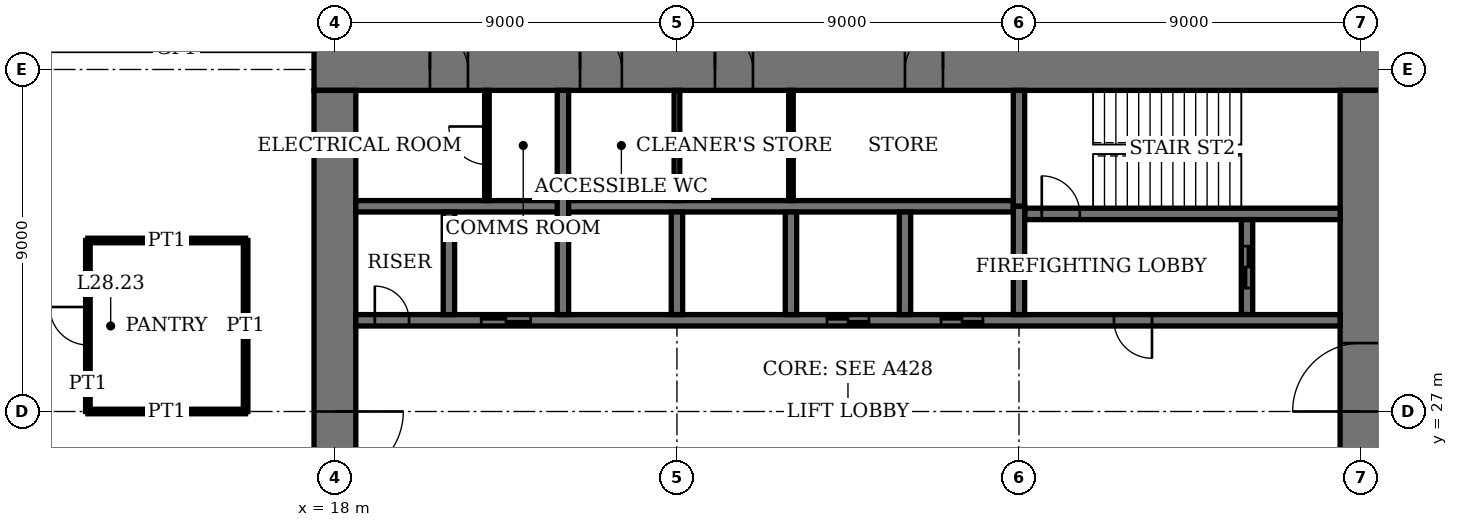
"""IFC4 building model, lengths in metres.
Left out: names, types, materials, properties, quantities, classifications, styles, units other than length and angle.
Written with IfcOpenShell. Run it as: python <this file> out.ifc"""

import sys

from ifc_helpers import new_model, si_unit, direction, frame, frame_2d, origin, place, context, subcontext, project, spatial, rectangle, extrude, element, fill, save


model = new_model("IFC4")
c1 = context("Model", 3, precision=1e-05, world=origin(), true_north=direction((0.0, 1.0)))
c2 = subcontext(c1, "Body", "Model", "MODEL_VIEW")
j1 = project(units=[si_unit("LENGTHUNIT", "METRE"), si_unit("PLANEANGLEUNIT", "RADIAN")], contexts=[c1])
p1 = place(None, origin())
s1 = spatial("IfcSite", under=j1, at=p1, CompositionType="ELEMENT")
p2 = place(p1, origin())
s2 = spatial("IfcBuilding", under=s1, at=p2, CompositionType="ELEMENT")
p3 = place(p2, frame((0.0, 0.0, 117.0)))
s3 = spatial("IfcBuildingStorey", under=s2, at=p3, CompositionType="ELEMENT", Elevation=117.0)
p4 = place(p3, frame((45.55, 36.0, 0.0), z_axis=(0.0, 0.0, 1.0), x_axis=(-1.0, 0.0, 0.0)))
e1 = element("IfcWall", 1, at=p4, inside=s3, PredefinedType="SHEAR", context=c2, shape_type="SweptSolid", body=[
    extrude(rectangle(XDim=28.1, YDim=1.1, at=frame_2d((14.05, 0.0))), origin(), (0.0, 0.0, 1.0), 4.0),
])
p5 = place(p4, frame((11.55, 0.0, 0.0)))
e2 = element("IfcOpeningElement", 2, at=p5, cuts=e1, PredefinedType="OPENING", context=c2, shape_type="SweptSolid", body=[
    extrude(rectangle(XDim=1.0, YDim=2.4, at=frame_2d((0.5, 1.2))), frame((0.0, 0.56, 0.0), z_axis=(0.0, -1.0, 0.0), x_axis=(1.0, 0.0, 0.0)), (0.0, 0.0, 1.0), 1.12),
])
p6 = place(p4, frame((16.55, 0.0, 0.0)))
e3 = element("IfcOpeningElement", 3, at=p6, cuts=e1, PredefinedType="OPENING", context=c2, shape_type="SweptSolid", body=[
    extrude(rectangle(XDim=1.0, YDim=2.4, at=frame_2d((0.5, 1.2))), frame((0.0, 0.56, 0.0), z_axis=(0.0, -1.0, 0.0), x_axis=(1.0, 0.0, 0.0)), (0.0, 0.0, 1.0), 1.12),
])
p7 = place(p4, frame((20.0, 0.0, 0.0)))
e4 = element("IfcOpeningElement", 4, at=p7, cuts=e1, PredefinedType="OPENING", context=c2, shape_type="SweptSolid", body=[
    extrude(rectangle(XDim=1.1, YDim=2.4, at=frame_2d((0.55, 1.2))), frame((0.0, 0.56, 0.0), z_axis=(0.0, -1.0, 0.0), x_axis=(1.0, 0.0, 0.0)), (0.0, 0.0, 1.0), 1.12),
])
p8 = place(p4, frame((24.05, 0.0, 0.0)))
e5 = element("IfcOpeningElement", 5, at=p8, cuts=e1, PredefinedType="OPENING", context=c2, shape_type="SweptSolid", body=[
    extrude(rectangle(XDim=1.0, YDim=2.4, at=frame_2d((0.5, 1.2))), frame((0.0, 0.56, 0.0), z_axis=(0.0, -1.0, 0.0), x_axis=(1.0, 0.0, 0.0)), (0.0, 0.0, 1.0), 1.12),
])
p9 = place(p3, frame((18.0, 35.45, 0.0), z_axis=(0.0, 0.0, 1.0), x_axis=(0.0, -1.0, 0.0)))
e6 = element("IfcWall", 6, at=p9, inside=s3, PredefinedType="SHEAR", context=c2, shape_type="SweptSolid", body=[
    extrude(rectangle(XDim=16.9, YDim=1.1, at=frame_2d((8.45, 0.0))), origin(), (0.0, 0.0, 1.0), 4.0),
])
p10 = place(p9, frame((8.45, 0.0, 0.0)))
e7 = element("IfcOpeningElement", 7, at=p10, cuts=e6, PredefinedType="OPENING", context=c2, shape_type="SweptSolid", body=[
    extrude(rectangle(XDim=1.8, YDim=2.4, at=frame_2d((0.9, 1.2))), frame((0.0, 0.56, 0.0), z_axis=(0.0, -1.0, 0.0), x_axis=(1.0, 0.0, 0.0)), (0.0, 0.0, 1.0), 1.12),
])
p11 = place(p3, frame((45.0, 18.55, 0.0), z_axis=(0.0, 0.0, 1.0), x_axis=(0.0, 1.0, 0.0)))
e8 = element("IfcWall", 8, at=p11, inside=s3, PredefinedType="SHEAR", context=c2, shape_type="SweptSolid", body=[
    extrude(rectangle(XDim=16.9, YDim=1.1, at=frame_2d((8.45, 0.0))), origin(), (0.0, 0.0, 1.0), 4.0),
])
p12 = place(p11, frame((8.45, 0.0, 0.0)))
e9 = element("IfcOpeningElement", 9, at=p12, cuts=e8, PredefinedType="OPENING", context=c2, shape_type="SweptSolid", body=[
    extrude(rectangle(XDim=1.8, YDim=2.4, at=frame_2d((0.9, 1.2))), frame((0.0, 0.56, 0.0), z_axis=(0.0, -1.0, 0.0), x_axis=(1.0, 0.0, 0.0)), (0.0, 0.0, 1.0), 1.12),
])
p13 = place(p3, frame((36.15, 32.2, 0.0), z_axis=(0.0, 0.0, 1.0), x_axis=(1.0, 0.0, 0.0)))
e10 = element("IfcWall", 10, at=p13, inside=s3, PredefinedType="SHEAR", context=c2, shape_type="SweptSolid", body=[
    extrude(rectangle(XDim=8.3, YDim=0.3, at=frame_2d((4.15, 0.0))), origin(), (0.0, 0.0, 1.0), 4.0),
])
p14 = place(p13, frame((0.45, 0.0, 0.0)))
e11 = element("IfcOpeningElement", 11, at=p14, cuts=e10, PredefinedType="OPENING", context=c2, shape_type="SweptSolid", body=[
    extrude(rectangle(XDim=1.0, YDim=2.4, at=frame_2d((0.5, 1.2))), frame((0.0, 0.16, 0.0), z_axis=(0.0, -1.0, 0.0), x_axis=(1.0, 0.0, 0.0)), (0.0, 0.0, 1.0), 0.32),
])
p15 = place(p3, frame((36.0, 32.4, 0.0), z_axis=(0.0, 0.0, 1.0), x_axis=(0.0, 1.0, 0.0)))
e12 = element("IfcWall", 12, at=p15, inside=s3, PredefinedType="SHEAR", context=c2, shape_type="SweptSolid", body=[
    extrude(rectangle(XDim=3.05, YDim=0.3, at=frame_2d((1.525, 0.0))), origin(), (0.0, 0.0, 1.0), 4.0),
])
p16 = place(p3, frame((42.0, 29.55, 0.0), z_axis=(0.0, 0.0, 1.0), x_axis=(0.0, 1.0, 0.0)))
e13 = element("IfcWall", 13, at=p16, inside=s3, PredefinedType="SHEAR", context=c2, shape_type="SweptSolid", body=[
    extrude(rectangle(XDim=2.5, YDim=0.3, at=frame_2d((1.25, 0.0))), origin(), (0.0, 0.0, 1.0), 4.0),
])
p17 = place(p16, frame((0.7, 0.0, 0.0)))
e14 = element("IfcOpeningElement", 14, at=p17, cuts=e13, PredefinedType="OPENING", context=c2, shape_type="SweptSolid", body=[
    extrude(rectangle(XDim=1.1, YDim=2.4, at=frame_2d((0.55, 1.2))), frame((0.0, 0.16, 0.0), z_axis=(0.0, -1.0, 0.0), x_axis=(1.0, 0.0, 0.0)), (0.0, 0.0, 1.0), 0.32),
])
p18 = place(p3, frame((18.55, 29.4, 0.0), z_axis=(0.0, 0.0, 1.0), x_axis=(1.0, 0.0, 0.0)))
e15 = element("IfcWall", 15, at=p18, inside=s3, PredefinedType="SHEAR", context=c2, shape_type="SweptSolid", body=[
    extrude(rectangle(XDim=25.9, YDim=0.3, at=frame_2d((12.95, 0.0))), origin(), (0.0, 0.0, 1.0), 4.0),
])
p19 = place(p18, frame((19.95, 0.0, 0.0)))
e16 = element("IfcOpeningElement", 16, at=p19, cuts=e15, PredefinedType="OPENING", context=c2, shape_type="SweptSolid", body=[
    extrude(rectangle(XDim=1.0, YDim=2.4, at=frame_2d((0.5, 1.2))), frame((0.0, 0.16, 0.0), z_axis=(0.0, -1.0, 0.0), x_axis=(1.0, 0.0, 0.0)), (0.0, 0.0, 1.0), 0.32),
])
p20 = place(p18, frame((0.5, 0.0, 0.0)))
e17 = element("IfcOpeningElement", 17, at=p20, cuts=e15, PredefinedType="OPENING", context=c2, shape_type="SweptSolid", body=[
    extrude(rectangle(XDim=0.9, YDim=2.1, at=frame_2d((0.45, 1.05))), frame((0.0, 0.16, 0.0), z_axis=(0.0, -1.0, 0.0), x_axis=(1.0, 0.0, 0.0)), (0.0, 0.0, 1.0), 0.32),
])
p21 = place(p18, frame((15.4, 0.0, 0.0)))
e18 = element("IfcOpeningElement", 18, at=p21, cuts=e15, PredefinedType="OPENING", context=c2, shape_type="SweptSolid", body=[
    extrude(rectangle(XDim=1.1, YDim=2.4, at=frame_2d((0.55, 1.2))), frame((0.0, 0.16, 0.0), z_axis=(0.0, -1.0, 0.0), x_axis=(1.0, 0.0, 0.0)), (0.0, 0.0, 1.0), 0.32),
])
p22 = place(p18, frame((12.4, 0.0, 0.0)))
e19 = element("IfcOpeningElement", 19, at=p22, cuts=e15, PredefinedType="OPENING", context=c2, shape_type="SweptSolid", body=[
    extrude(rectangle(XDim=1.1, YDim=2.4, at=frame_2d((0.55, 1.2))), frame((0.0, 0.16, 0.0), z_axis=(0.0, -1.0, 0.0), x_axis=(1.0, 0.0, 0.0)), (0.0, 0.0, 1.0), 0.32),
])
p23 = place(p18, frame((3.3, 0.0, 0.0)))
e20 = element("IfcOpeningElement", 20, at=p23, cuts=e15, PredefinedType="OPENING", context=c2, shape_type="SweptSolid", body=[
    extrude(rectangle(XDim=1.3, YDim=2.4, at=frame_2d((0.65, 1.2))), frame((0.0, 0.16, 0.0), z_axis=(0.0, -1.0, 0.0), x_axis=(1.0, 0.0, 0.0)), (0.0, 0.0, 1.0), 0.32),
])
p24 = place(p3, frame((18.55, 32.4, 0.0), z_axis=(0.0, 0.0, 1.0), x_axis=(1.0, 0.0, 0.0)))
e21 = element("IfcWall", 21, at=p24, inside=s3, PredefinedType="SHEAR", context=c2, shape_type="SweptSolid", body=[
    extrude(rectangle(XDim=17.3, YDim=0.3, at=frame_2d((8.65, 0.0))), origin(), (0.0, 0.0, 1.0), 4.0),
])
for number, where, z_axis, x_axis in (
    (22, (33.0, 29.55, 0.0), (0.0, 0.0, 1.0), (0.0, 1.0, 0.0)),
    (23, (30.0, 29.55, 0.0), (0.0, 0.0, 1.0), (0.0, 1.0, 0.0)),
    (24, (27.0, 29.55, 0.0), (0.0, 0.0, 1.0), (0.0, 1.0, 0.0)),
):
    element("IfcWall", number, at=place(p3, frame(where, z_axis=z_axis, x_axis=x_axis)), inside=s3, PredefinedType="SHEAR", context=c2, shape_type="SweptSolid", body=[
        extrude(rectangle(XDim=2.7, YDim=0.3, at=frame_2d((1.35, 0.0))), origin(), (0.0, 0.0, 1.0), 4.0),
    ])
p25 = place(p3, frame((24.0, 29.55, 0.0), z_axis=(0.0, 0.0, 1.0), x_axis=(0.0, 1.0, 0.0)))
e25 = element("IfcWall", 25, at=p25, inside=s3, PredefinedType="SHEAR", context=c2, shape_type="SweptSolid", body=[
    extrude(rectangle(XDim=5.9, YDim=0.3, at=frame_2d((2.95, 0.0))), origin(), (0.0, 0.0, 1.0), 4.0),
])
p26 = place(p3, frame((21.0, 29.55, 0.0), z_axis=(0.0, 0.0, 1.0), x_axis=(0.0, 1.0, 0.0)))
e26 = element("IfcWall", 26, at=p26, inside=s3, PredefinedType="SHEAR", context=c2, shape_type="SweptSolid", body=[
    extrude(rectangle(XDim=2.7, YDim=0.3, at=frame_2d((1.35, 0.0))), origin(), (0.0, 0.0, 1.0), 4.0),
])
p27 = place(p3, frame((36.0, 29.55, 0.0), z_axis=(0.0, 0.0, 1.0), x_axis=(0.0, 1.0, 0.0)))
e27 = element("IfcWall", 27, at=p27, inside=s3, PredefinedType="SHEAR", context=c2, shape_type="SweptSolid", body=[
    extrude(rectangle(XDim=2.85, YDim=0.3, at=frame_2d((1.425, 0.0))), origin(), (0.0, 0.0, 1.0), 4.0),
])
p28 = place(p3, frame((11.5, 27.0, 0.0), z_axis=(0.0, 0.0, 1.0), x_axis=(1.0, 0.0, 0.0)))
e28 = element("IfcWall", 28, at=p28, inside=s3, PredefinedType="PARTITIONING", context=c2, shape_type="SweptSolid", body=[
    extrude(rectangle(XDim=4.15, YDim=0.12, at=frame_2d((2.075, 0.0))), origin(), (0.0, 0.0, 1.0), 3.05),
])
p29 = place(p3, frame((11.5, 31.5, 0.0), z_axis=(0.0, 0.0, 1.0), x_axis=(1.0, 0.0, 0.0)))
e29 = element("IfcWall", 29, at=p29, inside=s3, PredefinedType="PARTITIONING", context=c2, shape_type="SweptSolid", body=[
    extrude(rectangle(XDim=4.15, YDim=0.12, at=frame_2d((2.075, 0.0))), origin(), (0.0, 0.0, 1.0), 3.1),
])
p30 = place(p3, frame((11.5, 27.0, 0.0), z_axis=(0.0, 0.0, 1.0), x_axis=(0.0, 1.0, 0.0)))
e30 = element("IfcWall", 30, at=p30, inside=s3, PredefinedType="PARTITIONING", context=c2, shape_type="SweptSolid", body=[
    extrude(rectangle(XDim=4.5, YDim=0.12, at=frame_2d((2.25, 0.0))), origin(), (0.0, 0.0, 1.0), 3.75),
])
p31 = place(p30, frame((1.75, 0.0, 0.0)))
e31 = element("IfcOpeningElement", 31, at=p31, cuts=e30, PredefinedType="OPENING", context=c2, shape_type="SweptSolid", body=[
    extrude(rectangle(XDim=1.0, YDim=2.4, at=frame_2d((0.5, 1.2))), frame((0.0, 0.07, 0.0), z_axis=(0.0, -1.0, 0.0), x_axis=(1.0, 0.0, 0.0)), (0.0, 0.0, 1.0), 0.14),
])
p32 = place(p3, frame((15.65, 27.0, 0.0), z_axis=(0.0, 0.0, 1.0), x_axis=(0.0, 1.0, 0.0)))
e32 = element("IfcWall", 32, at=p32, inside=s3, PredefinedType="PARTITIONING", context=c2, shape_type="SweptSolid", body=[
    extrude(rectangle(XDim=4.5, YDim=0.12, at=frame_2d((2.25, 0.0))), origin(), (0.0, 0.0, 1.0), 3.75),
])
p33 = place(p3, frame((30.0, 32.55, 0.0), z_axis=(0.0, 0.0, 1.0), x_axis=(0.0, 1.0, 0.0)))
e33 = element("IfcWall", 33, at=p33, inside=s3, PredefinedType="PARTITIONING", context=c2, shape_type="SweptSolid", body=[
    extrude(rectangle(XDim=2.9, YDim=0.12, at=frame_2d((1.45, 0.0))), origin(), (0.0, 0.0, 1.0), 3.75),
])
p34 = place(p3, frame((27.0, 32.55, 0.0), z_axis=(0.0, 0.0, 1.0), x_axis=(0.0, 1.0, 0.0)))
e34 = element("IfcWall", 34, at=p34, inside=s3, PredefinedType="PARTITIONING", context=c2, shape_type="SweptSolid", body=[
    extrude(rectangle(XDim=2.9, YDim=0.15, at=frame_2d((1.45, 0.0))), origin(), (0.0, 0.0, 1.0), 3.75),
])
p35 = place(p3, frame((22.0, 32.55, 0.0), z_axis=(0.0, 0.0, 1.0), x_axis=(0.0, 1.0, 0.0)))
e35 = element("IfcWall", 35, at=p35, inside=s3, PredefinedType="PARTITIONING", context=c2, shape_type="SweptSolid", body=[
    extrude(rectangle(XDim=2.9, YDim=0.12, at=frame_2d((1.45, 0.0))), origin(), (0.0, 0.0, 1.0), 3.75),
])
p36 = place(p35, frame((0.95, 0.0, 0.0)))
e36 = element("IfcOpeningElement", 36, at=p36, cuts=e35, PredefinedType="OPENING", context=c2, shape_type="SweptSolid", body=[
    extrude(rectangle(XDim=1.0, YDim=2.4, at=frame_2d((0.5, 1.2))), frame((0.0, 0.07, 0.0), z_axis=(0.0, -1.0, 0.0), x_axis=(1.0, 0.0, 0.0)), (0.0, 0.0, 1.0), 0.14),
])
p37 = place(p10, origin())
e37 = element("IfcDoor", 37, at=p37, inside=s3, OperationType="DOUBLE_DOOR_DOUBLE_SWING", PredefinedType="DOOR", context=c2, shape_type="SweptSolid", body=[
    extrude(rectangle(XDim=1.8, YDim=2.4, at=frame_2d((0.9, 1.2))), frame((0.0, 0.03, 0.0), z_axis=(0.0, -1.0, 0.0), x_axis=(1.0, 0.0, 0.0)), (0.0, 0.0, 1.0), 0.06),
    extrude(rectangle(XDim=0.04, YDim=2.4, at=frame_2d((0.02, 1.2))), frame((0.0, 0.55, 0.0), z_axis=(0.0, -1.0, 0.0), x_axis=(1.0, 0.0, 0.0)), (0.0, 0.0, 1.0), 1.1),
    extrude(rectangle(XDim=0.04, YDim=2.4, at=frame_2d((1.78, 1.2))), frame((0.0, 0.55, 0.0), z_axis=(0.0, -1.0, 0.0), x_axis=(1.0, 0.0, 0.0)), (0.0, 0.0, 1.0), 1.1),
    extrude(rectangle(XDim=1.8, YDim=0.04, at=frame_2d((0.9, 2.38))), frame((0.0, 0.55, 0.0), z_axis=(0.0, -1.0, 0.0), x_axis=(1.0, 0.0, 0.0)), (0.0, 0.0, 1.0), 1.1),
])
fill(e7, e37)
p38 = place(p12, origin())
e38 = element("IfcDoor", 38, at=p38, inside=s3, OperationType="DOUBLE_DOOR_DOUBLE_SWING", PredefinedType="DOOR", context=c2, shape_type="SweptSolid", body=[
    extrude(rectangle(XDim=1.8, YDim=2.4, at=frame_2d((0.9, 1.2))), frame((0.0, 0.03, 0.0), z_axis=(0.0, -1.0, 0.0), x_axis=(1.0, 0.0, 0.0)), (0.0, 0.0, 1.0), 0.06),
    extrude(rectangle(XDim=0.04, YDim=2.4, at=frame_2d((0.02, 1.2))), frame((0.0, 0.55, 0.0), z_axis=(0.0, -1.0, 0.0), x_axis=(1.0, 0.0, 0.0)), (0.0, 0.0, 1.0), 1.1),
    extrude(rectangle(XDim=0.04, YDim=2.4, at=frame_2d((1.78, 1.2))), frame((0.0, 0.55, 0.0), z_axis=(0.0, -1.0, 0.0), x_axis=(1.0, 0.0, 0.0)), (0.0, 0.0, 1.0), 1.1),
    extrude(rectangle(XDim=1.8, YDim=0.04, at=frame_2d((0.9, 2.38))), frame((0.0, 0.55, 0.0), z_axis=(0.0, -1.0, 0.0), x_axis=(1.0, 0.0, 0.0)), (0.0, 0.0, 1.0), 1.1),
])
fill(e9, e38)
p39 = place(p5, origin())
e39 = element("IfcDoor", 39, at=p39, inside=s3, OperationType="SINGLE_SWING_LEFT", PredefinedType="DOOR", context=c2, shape_type="SweptSolid", body=[
    extrude(rectangle(XDim=1.0, YDim=2.4, at=frame_2d((0.5, 1.2))), frame((0.0, 0.025, 0.0), z_axis=(0.0, -1.0, 0.0), x_axis=(1.0, 0.0, 0.0)), (0.0, 0.0, 1.0), 0.05),
    extrude(rectangle(XDim=0.04, YDim=2.4, at=frame_2d((0.02, 1.2))), frame((0.0, 0.4, 0.0), z_axis=(0.0, -1.0, 0.0), x_axis=(1.0, 0.0, 0.0)), (0.0, 0.0, 1.0), 0.8),
    extrude(rectangle(XDim=0.04, YDim=2.4, at=frame_2d((0.98, 1.2))), frame((0.0, 0.4, 0.0), z_axis=(0.0, -1.0, 0.0), x_axis=(1.0, 0.0, 0.0)), (0.0, 0.0, 1.0), 0.8),
    extrude(rectangle(XDim=1.0, YDim=0.04, at=frame_2d((0.5, 2.38))), frame((0.0, 0.4, 0.0), z_axis=(0.0, -1.0, 0.0), x_axis=(1.0, 0.0, 0.0)), (0.0, 0.0, 1.0), 0.8),
])
fill(e2, e39)
p40 = place(p6, origin())
e40 = element("IfcDoor", 40, at=p40, inside=s3, OperationType="SINGLE_SWING_RIGHT", PredefinedType="DOOR", context=c2, shape_type="SweptSolid", body=[
    extrude(rectangle(XDim=1.0, YDim=2.4, at=frame_2d((0.5, 1.2))), frame((0.0, 0.025, 0.0), z_axis=(0.0, -1.0, 0.0), x_axis=(1.0, 0.0, 0.0)), (0.0, 0.0, 1.0), 0.05),
    extrude(rectangle(XDim=0.04, YDim=2.4, at=frame_2d((0.02, 1.2))), frame((0.0, 0.4, 0.0), z_axis=(0.0, -1.0, 0.0), x_axis=(1.0, 0.0, 0.0)), (0.0, 0.0, 1.0), 0.8),
    extrude(rectangle(XDim=0.04, YDim=2.4, at=frame_2d((0.98, 1.2))), frame((0.0, 0.4, 0.0), z_axis=(0.0, -1.0, 0.0), x_axis=(1.0, 0.0, 0.0)), (0.0, 0.0, 1.0), 0.8),
    extrude(rectangle(XDim=1.0, YDim=0.04, at=frame_2d((0.5, 2.38))), frame((0.0, 0.4, 0.0), z_axis=(0.0, -1.0, 0.0), x_axis=(1.0, 0.0, 0.0)), (0.0, 0.0, 1.0), 0.8),
])
fill(e3, e40)
p41 = place(p7, origin())
e41 = element("IfcDoor", 41, at=p41, inside=s3, OperationType="SINGLE_SWING_RIGHT", PredefinedType="DOOR", context=c2, shape_type="SweptSolid", body=[
    extrude(rectangle(XDim=1.1, YDim=2.4, at=frame_2d((0.55, 1.2))), frame((0.0, 0.025, 0.0), z_axis=(0.0, -1.0, 0.0), x_axis=(1.0, 0.0, 0.0)), (0.0, 0.0, 1.0), 0.05),
    extrude(rectangle(XDim=0.04, YDim=2.4, at=frame_2d((0.02, 1.2))), frame((0.0, 0.44, 0.0), z_axis=(0.0, -1.0, 0.0), x_axis=(1.0, 0.0, 0.0)), (0.0, 0.0, 1.0), 0.88),
    extrude(rectangle(XDim=0.04, YDim=2.4, at=frame_2d((1.08, 1.2))), frame((0.0, 0.44, 0.0), z_axis=(0.0, -1.0, 0.0), x_axis=(1.0, 0.0, 0.0)), (0.0, 0.0, 1.0), 0.88),
    extrude(rectangle(XDim=1.1, YDim=0.04, at=frame_2d((0.55, 2.38))), frame((0.0, 0.44, 0.0), z_axis=(0.0, -1.0, 0.0), x_axis=(1.0, 0.0, 0.0)), (0.0, 0.0, 1.0), 0.88),
])
fill(e4, e41)
p42 = place(p8, origin())
e42 = element("IfcDoor", 42, at=p42, inside=s3, OperationType="SINGLE_SWING_RIGHT", PredefinedType="DOOR", context=c2, shape_type="SweptSolid", body=[
    extrude(rectangle(XDim=1.0, YDim=2.4, at=frame_2d((0.5, 1.2))), frame((0.0, 0.025, 0.0), z_axis=(0.0, -1.0, 0.0), x_axis=(1.0, 0.0, 0.0)), (0.0, 0.0, 1.0), 0.05),
    extrude(rectangle(XDim=0.04, YDim=2.4, at=frame_2d((0.02, 1.2))), frame((0.0, 0.4, 0.0), z_axis=(0.0, -1.0, 0.0), x_axis=(1.0, 0.0, 0.0)), (0.0, 0.0, 1.0), 0.8),
    extrude(rectangle(XDim=0.04, YDim=2.4, at=frame_2d((0.98, 1.2))), frame((0.0, 0.4, 0.0), z_axis=(0.0, -1.0, 0.0), x_axis=(1.0, 0.0, 0.0)), (0.0, 0.0, 1.0), 0.8),
    extrude(rectangle(XDim=1.0, YDim=0.04, at=frame_2d((0.5, 2.38))), frame((0.0, 0.4, 0.0), z_axis=(0.0, -1.0, 0.0), x_axis=(1.0, 0.0, 0.0)), (0.0, 0.0, 1.0), 0.8),
])
fill(e5, e42)
p43 = place(p14, origin())
e43 = element("IfcDoor", 43, at=p43, inside=s3, OperationType="SINGLE_SWING_RIGHT", PredefinedType="DOOR", context=c2, shape_type="SweptSolid", body=[
    extrude(rectangle(XDim=1.0, YDim=2.4, at=frame_2d((0.5, 1.2))), frame((0.0, 0.03, 0.0), z_axis=(0.0, -1.0, 0.0), x_axis=(1.0, 0.0, 0.0)), (0.0, 0.0, 1.0), 0.06),
])
fill(e11, e43)
p44 = place(p19, origin())
e44 = element("IfcDoor", 44, at=p44, inside=s3, OperationType="SINGLE_SWING_RIGHT", PredefinedType="DOOR", context=c2, shape_type="SweptSolid", body=[
    extrude(rectangle(XDim=1.0, YDim=2.4, at=frame_2d((0.5, 1.2))), frame((0.0, 0.03, 0.0), z_axis=(0.0, -1.0, 0.0), x_axis=(1.0, 0.0, 0.0)), (0.0, 0.0, 1.0), 0.06),
])
fill(e16, e44)
p45 = place(p20, origin())
e45 = element("IfcDoor", 45, at=p45, inside=s3, OperationType="SINGLE_SWING_RIGHT", PredefinedType="DOOR", context=c2, shape_type="SweptSolid", body=[
    extrude(rectangle(XDim=0.9, YDim=2.1, at=frame_2d((0.45, 1.05))), frame((0.0, 0.03, 0.0), z_axis=(0.0, -1.0, 0.0), x_axis=(1.0, 0.0, 0.0)), (0.0, 0.0, 1.0), 0.06),
])
fill(e17, e45)
p46 = place(p31, origin())
e46 = element("IfcDoor", 46, at=p46, inside=s3, OperationType="SINGLE_SWING_LEFT", PredefinedType="DOOR", context=c2, shape_type="SweptSolid", body=[
    extrude(rectangle(XDim=1.0, YDim=2.4, at=frame_2d((0.5, 1.2))), frame((0.0, 0.025, 0.0), z_axis=(0.0, -1.0, 0.0), x_axis=(1.0, 0.0, 0.0)), (0.0, 0.0, 1.0), 0.05),
])
fill(e31, e46)
p47 = place(p36, origin())
e47 = element("IfcDoor", 47, at=p47, inside=s3, OperationType="SINGLE_SWING_LEFT", PredefinedType="DOOR", context=c2, shape_type="SweptSolid", body=[
    extrude(rectangle(XDim=1.0, YDim=2.4, at=frame_2d((0.5, 1.2))), frame((0.0, 0.03, 0.0), z_axis=(0.0, -1.0, 0.0), x_axis=(1.0, 0.0, 0.0)), (0.0, 0.0, 1.0), 0.06),
])
fill(e36, e47)
p48 = place(p21, origin())
e48 = element("IfcDoor", 48, at=p48, inside=s3, OperationType="DOUBLE_DOOR_SLIDING", PredefinedType="DOOR", context=c2, shape_type="SweptSolid", body=[
    extrude(rectangle(XDim=1.1, YDim=2.4, at=frame_2d((0.55, 1.2))), frame((0.0, 0.02, 0.0), z_axis=(0.0, -1.0, 0.0), x_axis=(1.0, 0.0, 0.0)), (0.0, 0.0, 1.0), 0.04),
])
fill(e18, e48)
p49 = place(p22, origin())
e49 = element("IfcDoor", 49, at=p49, inside=s3, OperationType="DOUBLE_DOOR_SLIDING", PredefinedType="DOOR", context=c2, shape_type="SweptSolid", body=[
    extrude(rectangle(XDim=1.1, YDim=2.4, at=frame_2d((0.55, 1.2))), frame((0.0, 0.02, 0.0), z_axis=(0.0, -1.0, 0.0), x_axis=(1.0, 0.0, 0.0)), (0.0, 0.0, 1.0), 0.04),
])
fill(e19, e49)
p50 = place(p23, origin())
e50 = element("IfcDoor", 50, at=p50, inside=s3, OperationType="DOUBLE_DOOR_SLIDING", PredefinedType="DOOR", context=c2, shape_type="SweptSolid", body=[
    extrude(rectangle(XDim=1.3, YDim=2.4, at=frame_2d((0.65, 1.2))), frame((0.0, 0.02, 0.0), z_axis=(0.0, -1.0, 0.0), x_axis=(1.0, 0.0, 0.0)), (0.0, 0.0, 1.0), 0.04),
])
fill(e20, e50)
p51 = place(p17, origin())
e51 = element("IfcDoor", 51, at=p51, inside=s3, OperationType="DOUBLE_DOOR_SLIDING", PredefinedType="DOOR", context=c2, shape_type="SweptSolid", body=[
    extrude(rectangle(XDim=1.1, YDim=2.4, at=frame_2d((0.55, 1.2))), frame((0.0, 0.03, 0.0), z_axis=(0.0, -1.0, 0.0), x_axis=(1.0, 0.0, 0.0)), (0.0, 0.0, 1.0), 0.06),
])
fill(e14, e51)
save(model, sys.argv[1])
